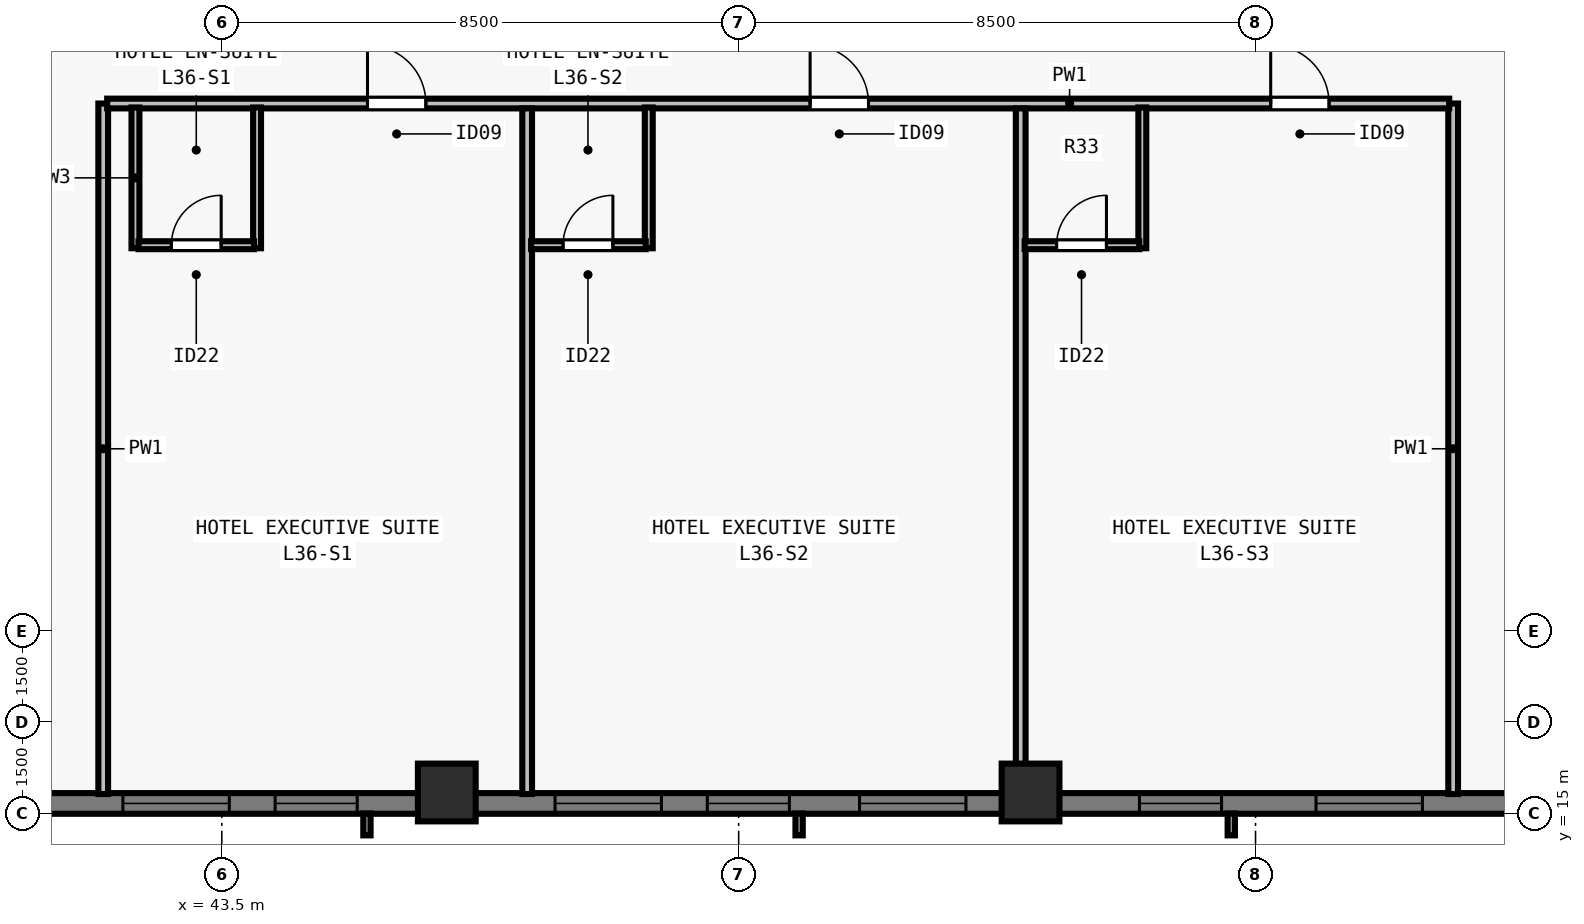
"""IFC4 building model, lengths in metres.
Left out: names, types, materials, properties, quantities, classifications, styles, units other than length and angle.
Written with IfcOpenShell. Run it as: python <this file> out.ifc"""

import sys

from ifc_helpers import new_model, si_unit, direction, frame, frame_2d, origin, origin_2d, place, context, subcontext, project, spatial, rectangle, extrude, element, fill, save


model = new_model("IFC4")
c1 = context("Model", 3, precision=1e-05, world=origin(), true_north=direction((0.0, 1.0)))
c2 = subcontext(c1, "Body", "Model", "MODEL_VIEW")
j1 = project(units=[si_unit("LENGTHUNIT", "METRE"), si_unit("PLANEANGLEUNIT", "RADIAN")], contexts=[c1])
p1 = place(None, origin())
s1 = spatial("IfcSite", under=j1, at=p1, CompositionType="ELEMENT")
p2 = place(p1, origin())
s2 = spatial("IfcBuilding", under=s1, at=p2, CompositionType="ELEMENT")
p3 = place(p2, frame((0.0, 0.0, 134.0)))
s3 = spatial("IfcBuildingStorey", under=s2, at=p3, CompositionType="ELEMENT", Elevation=134.0)
for number, where, z_axis, x_axis in (
    (1, (47.2, 15.35, 0.0), (0.0, 0.0, 1.0), (1.0, 0.0, 0.0)),
    (2, (56.8, 15.35, 0.0), (0.0, 0.0, 1.0), (1.0, 0.0, 0.0)),
):
    element("IfcColumn", number, at=place(p3, frame(where, z_axis=z_axis, x_axis=x_axis)), inside=s3, PredefinedType="COLUMN", context=c2, shape_type="SweptSolid", body=[
        extrude(rectangle(XDim=0.95, YDim=0.95, at=origin_2d()), origin(), (0.0, 0.0, 1.0), 3.5),
    ])
p4 = place(p3, frame((72.0, 15.17, 0.0), z_axis=(0.0, 0.0, 1.0), x_axis=(-1.0, 0.0, 0.0)))
e3 = element("IfcWall", 3, at=p4, inside=s3, PredefinedType="SOLIDWALL", context=c2, shape_type="SweptSolid", body=[
    extrude(rectangle(XDim=39.682, YDim=0.34, at=frame_2d((19.841, 0.0))), origin(), (0.0, 0.0, 1.0), 3.28),
])
p5 = place(p4, frame((8.755, 0.0, 0.8)))
e4 = element("IfcOpeningElement", 4, at=p5, cuts=e3, PredefinedType="OPENING", context=c2, shape_type="SweptSolid", body=[
    extrude(rectangle(XDim=1.75, YDim=1.66, at=frame_2d((0.875, 0.83))), frame((0.0, 0.18, 0.0), z_axis=(0.0, -1.0, 0.0), x_axis=(1.0, 0.0, 0.0)), (0.0, 0.0, 1.0), 0.36),
])
p6 = place(p4, frame((12.059, 0.0, 0.8)))
e5 = element("IfcOpeningElement", 5, at=p6, cuts=e3, PredefinedType="OPENING", context=c2, shape_type="SweptSolid", body=[
    extrude(rectangle(XDim=1.35, YDim=1.66, at=frame_2d((0.675, 0.83))), frame((0.0, 0.18, 0.0), z_axis=(0.0, -1.0, 0.0), x_axis=(1.0, 0.0, 0.0)), (0.0, 0.0, 1.0), 0.36),
])
p7 = place(p4, frame((16.262, 0.0, 0.8)))
e6 = element("IfcOpeningElement", 6, at=p7, cuts=e3, PredefinedType="OPENING", context=c2, shape_type="SweptSolid", body=[
    extrude(rectangle(XDim=1.75, YDim=1.66, at=frame_2d((0.875, 0.83))), frame((0.0, 0.18, 0.0), z_axis=(0.0, -1.0, 0.0), x_axis=(1.0, 0.0, 0.0)), (0.0, 0.0, 1.0), 0.36),
])
p8 = place(p4, frame((19.166, 0.0, 0.8)))
e7 = element("IfcOpeningElement", 7, at=p8, cuts=e3, PredefinedType="OPENING", context=c2, shape_type="SweptSolid", body=[
    extrude(rectangle(XDim=1.35, YDim=1.66, at=frame_2d((0.675, 0.83))), frame((0.0, 0.18, 0.0), z_axis=(0.0, -1.0, 0.0), x_axis=(1.0, 0.0, 0.0)), (0.0, 0.0, 1.0), 0.36),
])
p9 = place(p4, frame((21.27, 0.0, 0.8)))
e8 = element("IfcOpeningElement", 8, at=p9, cuts=e3, PredefinedType="OPENING", context=c2, shape_type="SweptSolid", body=[
    extrude(rectangle(XDim=1.75, YDim=1.66, at=frame_2d((0.875, 0.83))), frame((0.0, 0.18, 0.0), z_axis=(0.0, -1.0, 0.0), x_axis=(1.0, 0.0, 0.0)), (0.0, 0.0, 1.0), 0.36),
])
p10 = place(p4, frame((26.273, 0.0, 0.8)))
e9 = element("IfcOpeningElement", 9, at=p10, cuts=e3, PredefinedType="OPENING", context=c2, shape_type="SweptSolid", body=[
    extrude(rectangle(XDim=1.35, YDim=1.66, at=frame_2d((0.675, 0.83))), frame((0.0, 0.18, 0.0), z_axis=(0.0, -1.0, 0.0), x_axis=(1.0, 0.0, 0.0)), (0.0, 0.0, 1.0), 0.36),
])
p11 = place(p4, frame((28.377, 0.0, 0.8)))
e10 = element("IfcOpeningElement", 10, at=p11, cuts=e3, PredefinedType="OPENING", context=c2, shape_type="SweptSolid", body=[
    extrude(rectangle(XDim=1.75, YDim=1.66, at=frame_2d((0.875, 0.83))), frame((0.0, 0.18, 0.0), z_axis=(0.0, -1.0, 0.0), x_axis=(1.0, 0.0, 0.0)), (0.0, 0.0, 1.0), 0.36),
])
p12 = place(p4, frame((32.93, 0.0, 0.8)))
e11 = element("IfcOpeningElement", 11, at=p12, cuts=e3, PredefinedType="OPENING", context=c2, shape_type="SweptSolid", body=[
    extrude(rectangle(XDim=1.35, YDim=1.66, at=frame_2d((0.675, 0.83))), frame((0.0, 0.18, 0.0), z_axis=(0.0, -1.0, 0.0), x_axis=(1.0, 0.0, 0.0)), (0.0, 0.0, 1.0), 0.36),
])
p13 = place(p3, frame((41.55, 15.325, 0.0), z_axis=(0.0, 0.0, 1.0), x_axis=(0.0, 1.0, 0.0)))
e12 = element("IfcWall", 12, at=p13, inside=s3, PredefinedType="PARTITIONING", context=c2, shape_type="SweptSolid", body=[
    extrude(rectangle(XDim=11.355, YDim=0.16, at=frame_2d((5.677, 0.0))), origin(), (0.0, 0.0, 1.0), 3.28),
])
p14 = place(p3, frame((63.75, 15.325, 0.0), z_axis=(0.0, 0.0, 1.0), x_axis=(0.0, 1.0, 0.0)))
e13 = element("IfcWall", 13, at=p14, inside=s3, PredefinedType="PARTITIONING", context=c2, shape_type="SweptSolid", body=[
    extrude(rectangle(XDim=11.355, YDim=0.16, at=frame_2d((5.677, 0.0))), origin(), (0.0, 0.0, 1.0), 2.555),
])
p15 = place(p3, frame((41.615, 26.68, 0.0), z_axis=(0.0, 0.0, 1.0), x_axis=(1.0, 0.0, 0.0)))
e14 = element("IfcWall", 14, at=p15, inside=s3, PredefinedType="PARTITIONING", context=c2, shape_type="SweptSolid", body=[
    extrude(rectangle(XDim=22.07, YDim=0.16, at=frame_2d((11.035, 0.0))), origin(), (0.0, 0.0, 1.0), 3.28),
])
p16 = place(p15, frame((4.281, 0.0, 0.0)))
e15 = element("IfcOpeningElement", 15, at=p16, cuts=e14, PredefinedType="OPENING", context=c2, shape_type="SweptSolid", body=[
    extrude(rectangle(XDim=0.96, YDim=2.15, at=frame_2d((0.48, 1.075))), frame((0.0, 0.09, 0.0), z_axis=(0.0, -1.0, 0.0), x_axis=(1.0, 0.0, 0.0)), (0.0, 0.0, 1.0), 0.18),
])
p17 = place(p15, frame((11.56, 0.0, 0.0)))
e16 = element("IfcOpeningElement", 16, at=p17, cuts=e14, PredefinedType="OPENING", context=c2, shape_type="SweptSolid", body=[
    extrude(rectangle(XDim=0.96, YDim=2.15, at=frame_2d((0.48, 1.075))), frame((0.0, 0.09, 0.0), z_axis=(0.0, -1.0, 0.0), x_axis=(1.0, 0.0, 0.0)), (0.0, 0.0, 1.0), 0.18),
])
p18 = place(p15, frame((19.134, 0.0, 0.0)))
e17 = element("IfcOpeningElement", 17, at=p18, cuts=e14, PredefinedType="OPENING", context=c2, shape_type="SweptSolid", body=[
    extrude(rectangle(XDim=0.96, YDim=2.15, at=frame_2d((0.48, 1.075))), frame((0.0, 0.09, 0.0), z_axis=(0.0, -1.0, 0.0), x_axis=(1.0, 0.0, 0.0)), (0.0, 0.0, 1.0), 0.18),
])
for number, where, z_axis, x_axis in (
    (18, (42.08, 24.3, 0.0), (0.0, 0.0, 1.0), (0.0, 1.0, 0.0)),
    (19, (44.08, 24.3, 0.0), (0.0, 0.0, 1.0), (0.0, 1.0, 0.0)),
):
    element("IfcWall", number, at=place(p3, frame(where, z_axis=z_axis, x_axis=x_axis)), inside=s3, PredefinedType="PLUMBINGWALL", context=c2, shape_type="SweptSolid", body=[
        extrude(rectangle(XDim=2.315, YDim=0.13, at=frame_2d((1.157, 0.0))), origin(), (0.0, 0.0, 1.0), 3.28),
    ])
p19 = place(p3, frame((42.13, 24.35, 0.0), z_axis=(0.0, 0.0, 1.0), x_axis=(1.0, 0.0, 0.0)))
e20 = element("IfcWall", 20, at=p19, inside=s3, PredefinedType="PLUMBINGWALL", context=c2, shape_type="SweptSolid", body=[
    extrude(rectangle(XDim=1.9, YDim=0.13, at=frame_2d((0.95, 0.0))), origin(), (0.0, 0.0, 1.0), 3.28),
])
p20 = place(p19, frame((0.54, 0.0, 0.0)))
e21 = element("IfcOpeningElement", 21, at=p20, cuts=e20, PredefinedType="OPENING", context=c2, shape_type="SweptSolid", body=[
    extrude(rectangle(XDim=0.82, YDim=2.1, at=frame_2d((0.41, 1.05))), frame((0.0, 0.075, 0.0), z_axis=(0.0, -1.0, 0.0), x_axis=(1.0, 0.0, 0.0)), (0.0, 0.0, 1.0), 0.15),
])
p21 = place(p3, frame((48.522, 15.325, 0.0), z_axis=(0.0, 0.0, 1.0), x_axis=(0.0, 1.0, 0.0)))
e22 = element("IfcWall", 22, at=p21, inside=s3, PredefinedType="PARTITIONING", context=c2, shape_type="SweptSolid", body=[
    extrude(rectangle(XDim=11.275, YDim=0.16, at=frame_2d((5.638, 0.0))), origin(), (0.0, 0.0, 1.0), 2.896),
])
p22 = place(p3, frame((50.522, 24.3, 0.0), z_axis=(0.0, 0.0, 1.0), x_axis=(0.0, 1.0, 0.0)))
e23 = element("IfcWall", 23, at=p22, inside=s3, PredefinedType="PLUMBINGWALL", context=c2, shape_type="SweptSolid", body=[
    extrude(rectangle(XDim=2.315, YDim=0.13, at=frame_2d((1.157, 0.0))), origin(), (0.0, 0.0, 1.0), 3.28),
])
p23 = place(p3, frame((48.587, 24.35, 0.0), z_axis=(0.0, 0.0, 1.0), x_axis=(1.0, 0.0, 0.0)))
e24 = element("IfcWall", 24, at=p23, inside=s3, PredefinedType="PLUMBINGWALL", context=c2, shape_type="SweptSolid", body=[
    extrude(rectangle(XDim=1.885, YDim=0.13, at=frame_2d((0.942, 0.0))), origin(), (0.0, 0.0, 1.0), 3.28),
])
p24 = place(p23, frame((0.525, 0.0, 0.0)))
e25 = element("IfcOpeningElement", 25, at=p24, cuts=e24, PredefinedType="OPENING", context=c2, shape_type="SweptSolid", body=[
    extrude(rectangle(XDim=0.82, YDim=2.1, at=frame_2d((0.41, 1.05))), frame((0.0, 0.075, 0.0), z_axis=(0.0, -1.0, 0.0), x_axis=(1.0, 0.0, 0.0)), (0.0, 0.0, 1.0), 0.15),
])
p25 = place(p3, frame((56.638, 15.325, 0.0), z_axis=(0.0, 0.0, 1.0), x_axis=(0.0, 1.0, 0.0)))
e26 = element("IfcWall", 26, at=p25, inside=s3, PredefinedType="PARTITIONING", context=c2, shape_type="SweptSolid", body=[
    extrude(rectangle(XDim=11.275, YDim=0.16, at=frame_2d((5.638, 0.0))), origin(), (0.0, 0.0, 1.0), 2.555),
])
p26 = place(p3, frame((58.638, 24.3, 0.0), z_axis=(0.0, 0.0, 1.0), x_axis=(0.0, 1.0, 0.0)))
e27 = element("IfcWall", 27, at=p26, inside=s3, PredefinedType="PLUMBINGWALL", context=c2, shape_type="SweptSolid", body=[
    extrude(rectangle(XDim=2.315, YDim=0.13, at=frame_2d((1.157, 0.0))), origin(), (0.0, 0.0, 1.0), 3.28),
])
p27 = place(p3, frame((56.703, 24.35, 0.0), z_axis=(0.0, 0.0, 1.0), x_axis=(1.0, 0.0, 0.0)))
e28 = element("IfcWall", 28, at=p27, inside=s3, PredefinedType="PLUMBINGWALL", context=c2, shape_type="SweptSolid", body=[
    extrude(rectangle(XDim=1.885, YDim=0.13, at=frame_2d((0.942, 0.0))), origin(), (0.0, 0.0, 1.0), 3.28),
])
p28 = place(p27, frame((0.525, 0.0, 0.0)))
e29 = element("IfcOpeningElement", 29, at=p28, cuts=e28, PredefinedType="OPENING", context=c2, shape_type="SweptSolid", body=[
    extrude(rectangle(XDim=0.82, YDim=2.1, at=frame_2d((0.41, 1.05))), frame((0.0, 0.075, 0.0), z_axis=(0.0, -1.0, 0.0), x_axis=(1.0, 0.0, 0.0)), (0.0, 0.0, 1.0), 0.15),
])
p29 = place(p5, origin())
e30 = element("IfcWindow", 30, at=p29, inside=s3, PartitioningType="SINGLE_PANEL", PredefinedType="WINDOW", context=c2, shape_type="SweptSolid", body=[
    extrude(rectangle(XDim=1.75, YDim=1.66, at=frame_2d((0.875, 0.83))), frame((0.0, -0.05, 0.0), z_axis=(0.0, -1.0, 0.0), x_axis=(1.0, 0.0, 0.0)), (0.0, 0.0, 1.0), 0.06),
])
fill(e4, e30)
p30 = place(p6, origin())
e31 = element("IfcWindow", 31, at=p30, inside=s3, PartitioningType="SINGLE_PANEL", PredefinedType="WINDOW", context=c2, shape_type="SweptSolid", body=[
    extrude(rectangle(XDim=1.35, YDim=1.66, at=frame_2d((0.675, 0.83))), frame((0.0, -0.05, 0.0), z_axis=(0.0, -1.0, 0.0), x_axis=(1.0, 0.0, 0.0)), (0.0, 0.0, 1.0), 0.06),
])
fill(e5, e31)
p31 = place(p7, origin())
e32 = element("IfcWindow", 32, at=p31, inside=s3, PartitioningType="SINGLE_PANEL", PredefinedType="WINDOW", context=c2, shape_type="SweptSolid", body=[
    extrude(rectangle(XDim=1.75, YDim=1.66, at=frame_2d((0.875, 0.83))), frame((0.0, -0.05, 0.0), z_axis=(0.0, -1.0, 0.0), x_axis=(1.0, 0.0, 0.0)), (0.0, 0.0, 1.0), 0.06),
])
fill(e6, e32)
p32 = place(p8, origin())
e33 = element("IfcWindow", 33, at=p32, inside=s3, PartitioningType="SINGLE_PANEL", PredefinedType="WINDOW", context=c2, shape_type="SweptSolid", body=[
    extrude(rectangle(XDim=1.35, YDim=1.66, at=frame_2d((0.675, 0.83))), frame((0.0, -0.05, 0.0), z_axis=(0.0, -1.0, 0.0), x_axis=(1.0, 0.0, 0.0)), (0.0, 0.0, 1.0), 0.06),
])
fill(e7, e33)
p33 = place(p9, origin())
e34 = element("IfcWindow", 34, at=p33, inside=s3, PartitioningType="SINGLE_PANEL", PredefinedType="WINDOW", context=c2, shape_type="SweptSolid", body=[
    extrude(rectangle(XDim=1.75, YDim=1.66, at=frame_2d((0.875, 0.83))), frame((0.0, -0.05, 0.0), z_axis=(0.0, -1.0, 0.0), x_axis=(1.0, 0.0, 0.0)), (0.0, 0.0, 1.0), 0.06),
])
fill(e8, e34)
p34 = place(p10, origin())
e35 = element("IfcWindow", 35, at=p34, inside=s3, PartitioningType="SINGLE_PANEL", PredefinedType="WINDOW", context=c2, shape_type="SweptSolid", body=[
    extrude(rectangle(XDim=1.35, YDim=1.66, at=frame_2d((0.675, 0.83))), frame((0.0, -0.05, 0.0), z_axis=(0.0, -1.0, 0.0), x_axis=(1.0, 0.0, 0.0)), (0.0, 0.0, 1.0), 0.06),
])
fill(e9, e35)
p35 = place(p11, origin())
e36 = element("IfcWindow", 36, at=p35, inside=s3, PartitioningType="SINGLE_PANEL", PredefinedType="WINDOW", context=c2, shape_type="SweptSolid", body=[
    extrude(rectangle(XDim=1.75, YDim=1.66, at=frame_2d((0.875, 0.83))), frame((0.0, -0.05, 0.0), z_axis=(0.0, -1.0, 0.0), x_axis=(1.0, 0.0, 0.0)), (0.0, 0.0, 1.0), 0.06),
])
fill(e10, e36)
p36 = place(p20, origin())
e37 = element("IfcDoor", 37, at=p36, inside=s3, OperationType="SINGLE_SWING_RIGHT", PredefinedType="DOOR", context=c2, shape_type="SweptSolid", body=[
    extrude(rectangle(XDim=0.82, YDim=2.1, at=frame_2d((0.41, 1.05))), frame((0.0, 0.025, 0.0), z_axis=(0.0, -1.0, 0.0), x_axis=(1.0, 0.0, 0.0)), (0.0, 0.0, 1.0), 0.05),
])
fill(e21, e37)
p37 = place(p16, origin())
e38 = element("IfcDoor", 38, at=p37, inside=s3, OperationType="SINGLE_SWING_LEFT", PredefinedType="DOOR", context=c2, shape_type="SweptSolid", body=[
    extrude(rectangle(XDim=0.96, YDim=2.15, at=frame_2d((0.48, 1.075))), frame((0.0, 0.025, 0.0), z_axis=(0.0, -1.0, 0.0), x_axis=(1.0, 0.0, 0.0)), (0.0, 0.0, 1.0), 0.05),
])
fill(e15, e38)
p38 = place(p24, origin())
e39 = element("IfcDoor", 39, at=p38, inside=s3, OperationType="SINGLE_SWING_RIGHT", PredefinedType="DOOR", context=c2, shape_type="SweptSolid", body=[
    extrude(rectangle(XDim=0.82, YDim=2.1, at=frame_2d((0.41, 1.05))), frame((0.0, 0.025, 0.0), z_axis=(0.0, -1.0, 0.0), x_axis=(1.0, 0.0, 0.0)), (0.0, 0.0, 1.0), 0.05),
])
fill(e25, e39)
p39 = place(p17, origin())
e40 = element("IfcDoor", 40, at=p39, inside=s3, OperationType="SINGLE_SWING_LEFT", PredefinedType="DOOR", context=c2, shape_type="SweptSolid", body=[
    extrude(rectangle(XDim=0.96, YDim=2.15, at=frame_2d((0.48, 1.075))), frame((0.0, 0.025, 0.0), z_axis=(0.0, -1.0, 0.0), x_axis=(1.0, 0.0, 0.0)), (0.0, 0.0, 1.0), 0.05),
])
fill(e16, e40)
p40 = place(p28, origin())
e41 = element("IfcDoor", 41, at=p40, inside=s3, OperationType="SINGLE_SWING_RIGHT", PredefinedType="DOOR", context=c2, shape_type="SweptSolid", body=[
    extrude(rectangle(XDim=0.82, YDim=2.1, at=frame_2d((0.41, 1.05))), frame((0.0, 0.025, 0.0), z_axis=(0.0, -1.0, 0.0), x_axis=(1.0, 0.0, 0.0)), (0.0, 0.0, 1.0), 0.05),
])
fill(e29, e41)
p41 = place(p18, origin())
e42 = element("IfcDoor", 42, at=p41, inside=s3, OperationType="SINGLE_SWING_LEFT", PredefinedType="DOOR", context=c2, shape_type="SweptSolid", body=[
    extrude(rectangle(XDim=0.96, YDim=2.15, at=frame_2d((0.48, 1.075))), frame((0.0, 0.025, 0.0), z_axis=(0.0, -1.0, 0.0), x_axis=(1.0, 0.0, 0.0)), (0.0, 0.0, 1.0), 0.05),
])
fill(e17, e42)
save(model, sys.argv[1])
